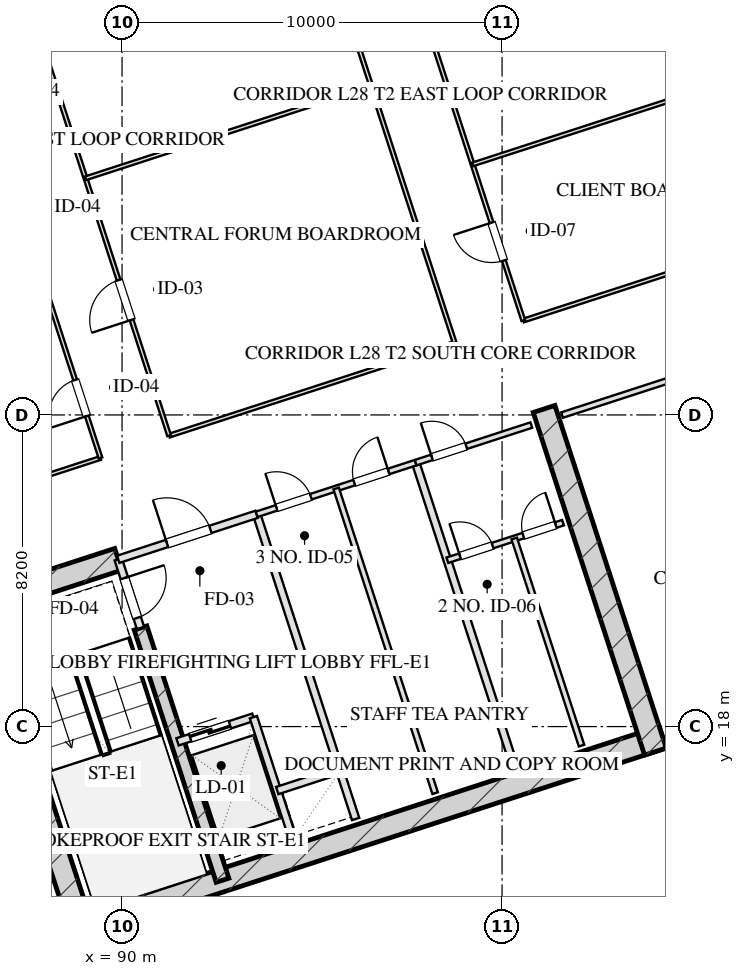
"""IFC4 building model, lengths in metres.
Left out: names, types, materials, properties, quantities, classifications, styles, units other than length and angle.
Written with IfcOpenShell. Run it as: python <this file> out.ifc"""

import sys

from ifc_helpers import new_model, si_unit, direction, frame, frame_2d, origin, place, context, subcontext, project, spatial, rectangle, extrude, element, fill, save


model = new_model("IFC4")
c1 = context("Model", 3, precision=1e-05, world=origin(), true_north=direction((0.0, 1.0)))
c2 = subcontext(c1, "Body", "Model", "MODEL_VIEW")
j1 = project(units=[si_unit("LENGTHUNIT", "METRE"), si_unit("PLANEANGLEUNIT", "RADIAN")], contexts=[c1])
p1 = place(None, origin())
s1 = spatial("IfcSite", under=j1, at=p1, CompositionType="ELEMENT")
p2 = place(p1, origin())
s2 = spatial("IfcBuilding", under=s1, at=p2, CompositionType="ELEMENT")
p3 = place(p2, frame((0.0, 0.0, 110.4)))
s3 = spatial("IfcBuildingStorey", under=s2, at=p3, CompositionType="ELEMENT", Elevation=110.4)
p4 = place(p3, frame((88.63, 12.652, 0.0), z_axis=(0.0, 0.0, 1.0), x_axis=(0.95105714907, 0.309015046886, 0.0)))
e1 = element("IfcWall", 1, at=p4, inside=s3, PredefinedType="SHEAR", context=c2, shape_type="SweptSolid", body=[
    extrude(rectangle(XDim=16.4, YDim=0.6, at=frame_2d((8.2, 0.0))), origin(), (0.0, 0.0, 1.0), 3.45),
])
p5 = place(p3, frame((86.078, 21.475, 0.0), z_axis=(0.0, 0.0, 1.0), x_axis=(0.309017938678, -0.951056209472, 0.0)))
e2 = element("IfcWall", 2, at=p5, inside=s3, PredefinedType="SHEAR", context=c2, shape_type="SweptSolid", body=[
    extrude(rectangle(XDim=9.48, YDim=0.6, at=frame_2d((4.74, 0.0))), origin(), (0.0, 0.0, 1.0), 3.45),
])
p6 = place(p3, frame((101.105, 26.358, 0.0), z_axis=(0.0, 0.0, 1.0), x_axis=(0.309010370028, -0.95105866865, 0.0)))
e3 = element("IfcWall", 3, at=p6, inside=s3, PredefinedType="SHEAR", context=c2, shape_type="SweptSolid", body=[
    extrude(rectangle(XDim=9.48, YDim=0.6, at=frame_2d((4.74, 0.0))), origin(), (0.0, 0.0, 1.0), 3.45),
])
p7 = place(p3, frame((90.486, 20.594, 0.0), z_axis=(0.0, 0.0, 1.0), x_axis=(0.309020428229, -0.951055400562, 0.0)))
e4 = element("IfcWall", 4, at=p7, inside=s3, PredefinedType="SHEAR", context=c2, shape_type="SweptSolid", body=[
    extrude(rectangle(XDim=6.98, YDim=0.35, at=frame_2d((3.49, 0.0))), origin(), (0.0, 0.0, 1.0), 3.45),
])
p8 = place(p3, frame((85.886, 21.097, 0.0), z_axis=(0.0, 0.0, 1.0), x_axis=(0.951068073652, 0.308981422225, 0.0)))
e5 = element("IfcWall", 5, at=p8, inside=s3, PredefinedType="SHEAR", context=c2, shape_type="SweptSolid", body=[
    extrude(rectangle(XDim=4.22, YDim=0.6, at=frame_2d((2.11, 0.0))), origin(), (0.0, 0.0, 1.0), 3.45),
])
p9 = place(p3, frame((99.284, 61.41, 0.0), z_axis=(0.0, 0.0, 1.0), x_axis=(0.309017542002, -0.95105633836, 0.0)))
e6 = element("IfcWall", 6, at=p9, inside=s3, PredefinedType="SOLIDWALL", context=c2, shape_type="SweptSolid", body=[
    extrude(rectangle(XDim=46.4, YDim=0.4, at=frame_2d((23.2, 0.0))), origin(), (0.0, 0.0, 1.0), 2.61),
])
p10 = place(p9, frame((15.6, 0.0, 0.75)))
e7 = element("IfcOpeningElement", 7, at=p10, cuts=e6, PredefinedType="OPENING", context=c2, shape_type="SweptSolid", body=[
    extrude(rectangle(XDim=2.4, YDim=1.46, at=frame_2d((1.2, 0.73))), frame((0.0, 0.21, 0.0), z_axis=(0.0, -1.0, 0.0), x_axis=(1.0, 0.0, 0.0)), (0.0, 0.0, 1.0), 0.42),
])
p11 = place(p9, frame((28.45, 0.0, 0.0)))
e8 = element("IfcOpeningElement", 8, at=p11, cuts=e6, PredefinedType="OPENING", context=c2, shape_type="SweptSolid", body=[
    extrude(rectangle(XDim=1.1, YDim=2.15, at=frame_2d((0.55, 1.075))), frame((0.0, 0.21, 0.0), z_axis=(0.0, -1.0, 0.0), x_axis=(1.0, 0.0, 0.0)), (0.0, 0.0, 1.0), 0.42),
])
p12 = place(p3, frame((111.953, 14.005, 0.0), z_axis=(0.0, 0.0, 1.0), x_axis=(-0.95105505922, -0.309021478754, 0.0)))
e9 = element("IfcWall", 9, at=p12, inside=s3, PredefinedType="SOLIDWALL", context=c2, shape_type="SweptSolid", body=[
    extrude(rectangle(XDim=29.4, YDim=0.4, at=frame_2d((14.7, 0.0))), origin(), (0.0, 0.0, 1.0), 2.61),
])
p13 = place(p3, frame((89.899, 22.401, 0.0), z_axis=(0.0, 0.0, 1.0), x_axis=(0.308932062672, -0.951084108086, 0.0)))
e10 = element("IfcWall", 10, at=p13, inside=s3, PredefinedType="PARTITIONING", context=c2, shape_type="SweptSolid", body=[
    extrude(rectangle(XDim=1.9, YDim=0.2, at=frame_2d((0.95, 0.0))), origin(), (0.0, 0.0, 1.0), 3.175),
])
p14 = place(p13, frame((0.52, 0.0, 0.0)))
e11 = element("IfcOpeningElement", 11, at=p14, cuts=e10, PredefinedType="OPENING", context=c2, shape_type="SweptSolid", body=[
    extrude(rectangle(XDim=1.1, YDim=2.05, at=frame_2d((0.55, 1.025))), frame((0.0, 0.11, 0.0), z_axis=(0.0, -1.0, 0.0), x_axis=(1.0, 0.0, 0.0)), (0.0, 0.0, 1.0), 0.22),
])
p15 = place(p3, frame((93.542, 23.585, 0.0), z_axis=(0.0, 0.0, 1.0), x_axis=(0.309042196757, -0.951048327176, 0.0)))
e12 = element("IfcWall", 12, at=p15, inside=s3, PredefinedType="PARTITIONING", context=c2, shape_type="SweptSolid", body=[
    extrude(rectangle(XDim=8.43, YDim=0.2, at=frame_2d((4.215, 0.0))), origin(), (0.0, 0.0, 1.0), 3.175),
])
p16 = place(p3, frame((89.899, 22.401, 0.0), z_axis=(0.0, 0.0, 1.0), x_axis=(0.951046716504, 0.309047153403, 0.0)))
e13 = element("IfcWall", 13, at=p16, inside=s3, PredefinedType="PARTITIONING", context=c2, shape_type="SweptSolid", body=[
    extrude(rectangle(XDim=3.83, YDim=0.2, at=frame_2d((1.915, 0.0))), origin(), (0.0, 0.0, 1.0), 3.175),
])
p17 = place(p16, frame((1.35, 0.0, 0.0)))
e14 = element("IfcOpeningElement", 14, at=p17, cuts=e13, PredefinedType="OPENING", context=c2, shape_type="SweptSolid", body=[
    extrude(rectangle(XDim=1.2, YDim=2.05, at=frame_2d((0.6, 1.025))), frame((0.0, 0.11, 0.0), z_axis=(0.0, -1.0, 0.0), x_axis=(1.0, 0.0, 0.0)), (0.0, 0.0, 1.0), 0.22),
])
p18 = place(p3, frame((91.46, 17.598, 0.0), z_axis=(0.0, 0.0, 1.0), x_axis=(0.951062257173, 0.308999325213, 0.0)))
e15 = element("IfcWall", 15, at=p18, inside=s3, PredefinedType="PARTITIONING", context=c2, shape_type="SweptSolid", body=[
    extrude(rectangle(XDim=2.1, YDim=0.2, at=frame_2d((1.05, 0.0))), origin(), (0.0, 0.0, 1.0), 3.175),
])
p19 = place(p18, frame((0.35, 0.0, 0.0)))
e16 = element("IfcOpeningElement", 16, at=p19, cuts=e15, PredefinedType="OPENING", context=c2, shape_type="SweptSolid", body=[
    extrude(rectangle(XDim=1.1, YDim=2.05, at=frame_2d((0.55, 1.025))), frame((0.0, 0.11, 0.0), z_axis=(0.0, -1.0, 0.0), x_axis=(1.0, 0.0, 0.0)), (0.0, 0.0, 1.0), 0.22),
])
p20 = place(p3, frame((93.457, 18.247, 0.0), z_axis=(0.0, 0.0, 1.0), x_axis=(0.3089935693, -0.951064127245, 0.0)))
e17 = element("IfcWall", 17, at=p20, inside=s3, PredefinedType="PARTITIONING", context=c2, shape_type="SweptSolid", body=[
    extrude(rectangle(XDim=3.7, YDim=0.2, at=frame_2d((1.85, 0.0))), origin(), (0.0, 0.0, 1.0), 3.175),
])
p21 = place(p3, frame((94.084, 16.317, 0.0), z_axis=(0.0, 0.0, 1.0), x_axis=(0.951041328149, 0.309063734775, 0.0)))
e18 = element("IfcWall", 18, at=p21, inside=s3, PredefinedType="PARTITIONING", context=c2, shape_type="SweptSolid", body=[
    extrude(rectangle(XDim=1.73, YDim=0.2, at=frame_2d((0.865, 0.0))), origin(), (0.0, 0.0, 1.0), 3.175),
])
p22 = place(p3, frame((97.727, 24.944, 0.0), z_axis=(0.0, 0.0, 1.0), x_axis=(0.309016001439, -0.951056838919, 0.0)))
e19 = element("IfcWall", 19, at=p22, inside=s3, PredefinedType="PARTITIONING", context=c2, shape_type="SweptSolid", body=[
    extrude(rectangle(XDim=8.43, YDim=0.2, at=frame_2d((4.215, 0.0))), origin(), (0.0, 0.0, 1.0), 3.175),
])
p23 = place(p3, frame((93.542, 23.585, 0.0), z_axis=(0.0, 0.0, 1.0), x_axis=(0.951063829732, 0.308994485023, 0.0)))
e20 = element("IfcWall", 20, at=p23, inside=s3, PredefinedType="PARTITIONING", context=c2, shape_type="SweptSolid", body=[
    extrude(rectangle(XDim=4.4, YDim=0.15, at=frame_2d((2.2, 0.0))), origin(), (0.0, 0.0, 1.0), 3.175),
])
p24 = place(p23, frame((0.55, 0.0, 0.0)))
e21 = element("IfcOpeningElement", 21, at=p24, cuts=e20, PredefinedType="OPENING", context=c2, shape_type="SweptSolid", body=[
    extrude(rectangle(XDim=0.95, YDim=2.05, at=frame_2d((0.475, 1.025))), frame((0.0, 0.085, 0.0), z_axis=(0.0, -1.0, 0.0), x_axis=(1.0, 0.0, 0.0)), (0.0, 0.0, 1.0), 0.17),
])
p25 = place(p23, frame((2.7, 0.0, 0.0)))
e22 = element("IfcOpeningElement", 22, at=p25, cuts=e20, PredefinedType="OPENING", context=c2, shape_type="SweptSolid", body=[
    extrude(rectangle(XDim=0.95, YDim=2.05, at=frame_2d((0.475, 1.025))), frame((0.0, 0.085, 0.0), z_axis=(0.0, -1.0, 0.0), x_axis=(1.0, 0.0, 0.0)), (0.0, 0.0, 1.0), 0.17),
])
p26 = place(p3, frame((95.634, 24.265, 0.0), z_axis=(0.0, 0.0, 1.0), x_axis=(0.309007490203, -0.951059604335, 0.0)))
e23 = element("IfcWall", 23, at=p26, inside=s3, PredefinedType="PARTITIONING", context=c2, shape_type="SweptSolid", body=[
    extrude(rectangle(XDim=8.43, YDim=0.15, at=frame_2d((4.215, 0.0))), origin(), (0.0, 0.0, 1.0), 3.175),
])
p27 = place(p3, frame((97.727, 24.944, 0.0), z_axis=(0.0, 0.0, 1.0), x_axis=(0.951036872128, 0.309077446369, 0.0)))
e24 = element("IfcWall", 24, at=p27, inside=s3, PredefinedType="PARTITIONING", context=c2, shape_type="SweptSolid", body=[
    extrude(rectangle(XDim=3.2, YDim=0.15, at=frame_2d((1.6, 0.0))), origin(), (0.0, 0.0, 1.0), 3.175),
])
p28 = place(p27, frame((0.45, 0.0, 0.0)))
e25 = element("IfcOpeningElement", 25, at=p28, cuts=e24, PredefinedType="OPENING", context=c2, shape_type="SweptSolid", body=[
    extrude(rectangle(XDim=0.95, YDim=2.05, at=frame_2d((0.475, 1.025))), frame((0.0, 0.085, 0.0), z_axis=(0.0, -1.0, 0.0), x_axis=(1.0, 0.0, 0.0)), (0.0, 0.0, 1.0), 0.17),
])
p29 = place(p3, frame((98.561, 22.376, 0.0), z_axis=(0.0, 0.0, 1.0), x_axis=(0.95104415986, 0.309055020985, 0.0)))
e26 = element("IfcWall", 26, at=p29, inside=s3, PredefinedType="PARTITIONING", context=c2, shape_type="SweptSolid", body=[
    extrude(rectangle(XDim=3.2, YDim=0.15, at=frame_2d((1.6, 0.0))), origin(), (0.0, 0.0, 1.0), 3.175),
])
p30 = place(p29, frame((0.35, 0.0, 0.0)))
e27 = element("IfcOpeningElement", 27, at=p30, cuts=e26, PredefinedType="OPENING", context=c2, shape_type="SweptSolid", body=[
    extrude(rectangle(XDim=0.9, YDim=2.05, at=frame_2d((0.45, 1.025))), frame((0.0, 0.085, 0.0), z_axis=(0.0, -1.0, 0.0), x_axis=(1.0, 0.0, 0.0)), (0.0, 0.0, 1.0), 0.17),
])
p31 = place(p29, frame((2.1, 0.0, 0.0)))
e28 = element("IfcOpeningElement", 28, at=p31, cuts=e26, PredefinedType="OPENING", context=c2, shape_type="SweptSolid", body=[
    extrude(rectangle(XDim=0.9, YDim=2.05, at=frame_2d((0.45, 1.025))), frame((0.0, 0.085, 0.0), z_axis=(0.0, -1.0, 0.0), x_axis=(1.0, 0.0, 0.0)), (0.0, 0.0, 1.0), 0.17),
])
p32 = place(p3, frame((100.32, 22.948, 0.0), z_axis=(0.0, 0.0, 1.0), x_axis=(0.309035009867, -0.951050662518, 0.0)))
e29 = element("IfcWall", 29, at=p32, inside=s3, PredefinedType="PARTITIONING", context=c2, shape_type="SweptSolid", body=[
    extrude(rectangle(XDim=5.73, YDim=0.15, at=frame_2d((2.865, 0.0))), origin(), (0.0, 0.0, 1.0), 3.175),
])
p33 = place(p3, frame((101.578, 26.196, 0.0), z_axis=(0.0, 0.0, 1.0), x_axis=(0.951062770994, 0.308997743729, 0.0)))
e30 = element("IfcWall", 30, at=p33, inside=s3, PredefinedType="PARTITIONING", context=c2, shape_type="SweptSolid", body=[
    extrude(rectangle(XDim=8.5, YDim=0.15, at=frame_2d((4.25, 0.0))), origin(), (0.0, 0.0, 1.0), 3.175),
])
p34 = place(p33, frame((3.57, 0.0, 0.0)))
e31 = element("IfcOpeningElement", 31, at=p34, cuts=e30, PredefinedType="OPENING", context=c2, shape_type="SweptSolid", body=[
    extrude(rectangle(XDim=0.85, YDim=2.05, at=frame_2d((0.425, 1.025))), frame((0.0, 0.085, 0.0), z_axis=(0.0, -1.0, 0.0), x_axis=(1.0, 0.0, 0.0)), (0.0, 0.0, 1.0), 0.17),
])
p35 = place(p3, frame((76.308, 20.803, 0.0), z_axis=(0.0, 0.0, 1.0), x_axis=(0.951058377365, 0.309011266531, 0.0)))
e32 = element("IfcWall", 32, at=p35, inside=s3, PredefinedType="MOVABLE", context=c2, shape_type="SweptSolid", body=[
    extrude(rectangle(XDim=13.8, YDim=0.1, at=frame_2d((6.9, 0.0))), origin(), (0.0, 0.0, 1.0), 3.175),
])
p36 = place(p3, frame((91.24, 25.655, 0.0), z_axis=(0.0, 0.0, 1.0), x_axis=(0.951060182336, 0.309005711233, 0.0)))
e33 = element("IfcWall", 33, at=p36, inside=s3, PredefinedType="MOVABLE", context=c2, shape_type="SweptSolid", body=[
    extrude(rectangle(XDim=7.9, YDim=0.1, at=frame_2d((3.95, 0.0))), origin(), (0.0, 0.0, 1.0), 3.175),
])
p37 = place(p3, frame((100.56, 28.683, 0.0), z_axis=(0.0, 0.0, 1.0), x_axis=(0.951055307445, 0.309020714809, 0.0)))
e34 = element("IfcWall", 34, at=p37, inside=s3, PredefinedType="MOVABLE", context=c2, shape_type="SweptSolid", body=[
    extrude(rectangle(XDim=8.7, YDim=0.1, at=frame_2d((4.35, 0.0))), origin(), (0.0, 0.0, 1.0), 3.175),
])
p38 = place(p3, frame((89.433, 25.067, 0.0), z_axis=(0.0, 0.0, 1.0), x_axis=(-0.30901773025, 0.951056277195, 0.0)))
e35 = element("IfcWall", 35, at=p38, inside=s3, PredefinedType="MOVABLE", context=c2, shape_type="SweptSolid", body=[
    extrude(rectangle(XDim=16.64, YDim=0.1, at=frame_2d((8.32, 0.0))), origin(), (0.0, 0.0, 1.0), 3.175),
])
p39 = place(p38, frame((1.16, 0.0, 0.0)))
e36 = element("IfcOpeningElement", 36, at=p39, cuts=e35, PredefinedType="OPENING", context=c2, shape_type="SweptSolid", body=[
    extrude(rectangle(XDim=1.0, YDim=2.05, at=frame_2d((0.5, 1.025))), frame((0.0, 0.06, 0.0), z_axis=(0.0, -1.0, 0.0), x_axis=(1.0, 0.0, 0.0)), (0.0, 0.0, 1.0), 0.12),
])
p40 = place(p38, frame((6.16, 0.0, 0.0)))
e37 = element("IfcOpeningElement", 37, at=p40, cuts=e35, PredefinedType="OPENING", context=c2, shape_type="SweptSolid", body=[
    extrude(rectangle(XDim=1.0, YDim=2.05, at=frame_2d((0.5, 1.025))), frame((0.0, 0.06, 0.0), z_axis=(0.0, -1.0, 0.0), x_axis=(1.0, 0.0, 0.0)), (0.0, 0.0, 1.0), 0.12),
])
p41 = place(p38, frame((10.16, 0.0, 0.0)))
e38 = element("IfcOpeningElement", 38, at=p41, cuts=e35, PredefinedType="OPENING", context=c2, shape_type="SweptSolid", body=[
    extrude(rectangle(XDim=1.0, YDim=2.05, at=frame_2d((0.5, 1.025))), frame((0.0, 0.06, 0.0), z_axis=(0.0, -1.0, 0.0), x_axis=(1.0, 0.0, 0.0)), (0.0, 0.0, 1.0), 0.12),
])
p42 = place(p38, frame((14.48, 0.0, 0.0)))
e39 = element("IfcOpeningElement", 39, at=p42, cuts=e35, PredefinedType="OPENING", context=c2, shape_type="SweptSolid", body=[
    extrude(rectangle(XDim=1.0, YDim=2.05, at=frame_2d((0.5, 1.025))), frame((0.0, 0.06, 0.0), z_axis=(0.0, -1.0, 0.0), x_axis=(1.0, 0.0, 0.0)), (0.0, 0.0, 1.0), 0.12),
])
p43 = place(p3, frame((91.24, 25.655, 0.0), z_axis=(0.0, 0.0, 1.0), x_axis=(-0.30901773025, 0.951056277195, 0.0)))
e40 = element("IfcWall", 40, at=p43, inside=s3, PredefinedType="MOVABLE", context=c2, shape_type="SweptSolid", body=[
    extrude(rectangle(XDim=16.64, YDim=0.1, at=frame_2d((8.32, 0.0))), origin(), (0.0, 0.0, 1.0), 3.175),
])
p44 = place(p43, frame((3.204, 0.0, 0.0)))
e41 = element("IfcOpeningElement", 41, at=p44, cuts=e40, PredefinedType="OPENING", context=c2, shape_type="SweptSolid", body=[
    extrude(rectangle(XDim=1.1, YDim=2.05, at=frame_2d((0.55, 1.025))), frame((0.0, 0.06, 0.0), z_axis=(0.0, -1.0, 0.0), x_axis=(1.0, 0.0, 0.0)), (0.0, 0.0, 1.0), 0.12),
])
p45 = place(p43, frame((11.404, 0.0, 0.0)))
e42 = element("IfcOpeningElement", 42, at=p45, cuts=e40, PredefinedType="OPENING", context=c2, shape_type="SweptSolid", body=[
    extrude(rectangle(XDim=1.1, YDim=2.05, at=frame_2d((0.55, 1.025))), frame((0.0, 0.06, 0.0), z_axis=(0.0, -1.0, 0.0), x_axis=(1.0, 0.0, 0.0)), (0.0, 0.0, 1.0), 0.12),
])
p46 = place(p3, frame((98.753, 28.096, 0.0), z_axis=(0.0, 0.0, 1.0), x_axis=(-0.30901773025, 0.951056277195, 0.0)))
e43 = element("IfcWall", 43, at=p46, inside=s3, PredefinedType="MOVABLE", context=c2, shape_type="SweptSolid", body=[
    extrude(rectangle(XDim=16.64, YDim=0.1, at=frame_2d((8.32, 0.0))), origin(), (0.0, 0.0, 1.0), 3.175),
])
p47 = place(p3, frame((100.56, 28.683, 0.0), z_axis=(0.0, 0.0, 1.0), x_axis=(-0.309004459387, 0.951060589068, 0.0)))
e44 = element("IfcWall", 44, at=p47, inside=s3, PredefinedType="MOVABLE", context=c2, shape_type="SweptSolid", body=[
    extrude(rectangle(XDim=16.64, YDim=0.1, at=frame_2d((8.32, 0.0))), origin(), (0.0, 0.0, 1.0), 3.175),
])
p48 = place(p47, frame((1.66, 0.0, 0.0)))
e45 = element("IfcOpeningElement", 45, at=p48, cuts=e44, PredefinedType="OPENING", context=c2, shape_type="SweptSolid", body=[
    extrude(rectangle(XDim=1.05, YDim=2.05, at=frame_2d((0.525, 1.025))), frame((0.0, 0.06, 0.0), z_axis=(0.0, -1.0, 0.0), x_axis=(1.0, 0.0, 0.0)), (0.0, 0.0, 1.0), 0.12),
])
p49 = place(p47, frame((7.82, 0.0, 0.0)))
e46 = element("IfcOpeningElement", 46, at=p49, cuts=e44, PredefinedType="OPENING", context=c2, shape_type="SweptSolid", body=[
    extrude(rectangle(XDim=1.0, YDim=2.05, at=frame_2d((0.5, 1.025))), frame((0.0, 0.06, 0.0), z_axis=(0.0, -1.0, 0.0), x_axis=(1.0, 0.0, 0.0)), (0.0, 0.0, 1.0), 0.12),
])
p50 = place(p47, frame((13.98, 0.0, 0.0)))
e47 = element("IfcOpeningElement", 47, at=p50, cuts=e44, PredefinedType="OPENING", context=c2, shape_type="SweptSolid", body=[
    extrude(rectangle(XDim=0.85, YDim=2.05, at=frame_2d((0.425, 1.025))), frame((0.0, 0.06, 0.0), z_axis=(0.0, -1.0, 0.0), x_axis=(1.0, 0.0, 0.0)), (0.0, 0.0, 1.0), 0.12),
])
p51 = place(p3, frame((89.039, 32.426, 0.0), z_axis=(0.0, 0.0, 1.0), x_axis=(0.951051099951, 0.309033663672, 0.0)))
e48 = element("IfcWall", 48, at=p51, inside=s3, PredefinedType="MOVABLE", context=c2, shape_type="SweptSolid", body=[
    extrude(rectangle(XDim=7.9, YDim=0.1, at=frame_2d((3.95, 0.0))), origin(), (0.0, 0.0, 1.0), 3.175),
])
p52 = place(p3, frame((99.225, 32.792, 0.0), z_axis=(0.0, 0.0, 1.0), x_axis=(0.951055307445, 0.309020714809, 0.0)))
e49 = element("IfcWall", 49, at=p52, inside=s3, PredefinedType="MOVABLE", context=c2, shape_type="SweptSolid", body=[
    extrude(rectangle(XDim=8.7, YDim=0.1, at=frame_2d((4.35, 0.0))), origin(), (0.0, 0.0, 1.0), 3.175),
])
p53 = place(p14, origin())
e50 = element("IfcDoor", 50, at=p53, inside=s3, OperationType="SINGLE_SWING_LEFT", PredefinedType="DOOR", context=c2, shape_type="SweptSolid", body=[
    extrude(rectangle(XDim=1.1, YDim=2.05, at=frame_2d((0.55, 1.025))), frame((0.0, 0.025, 0.0), z_axis=(0.0, -1.0, 0.0), x_axis=(1.0, 0.0, 0.0)), (0.0, 0.0, 1.0), 0.05),
])
fill(e11, e50)
p54 = place(p17, origin())
e51 = element("IfcDoor", 51, at=p54, inside=s3, OperationType="SINGLE_SWING_LEFT", PredefinedType="DOOR", context=c2, shape_type="SweptSolid", body=[
    extrude(rectangle(XDim=1.2, YDim=2.05, at=frame_2d((0.6, 1.025))), frame((0.0, 0.025, 0.0), z_axis=(0.0, -1.0, 0.0), x_axis=(1.0, 0.0, 0.0)), (0.0, 0.0, 1.0), 0.05),
])
fill(e14, e51)
p55 = place(p19, origin())
e52 = element("IfcDoor", 52, at=p55, inside=s3, OperationType="DOUBLE_DOOR_SLIDING", PredefinedType="DOOR", context=c2, shape_type="SweptSolid", body=[
    extrude(rectangle(XDim=1.1, YDim=2.05, at=frame_2d((0.55, 1.025))), frame((0.0, 0.025, 0.0), z_axis=(0.0, -1.0, 0.0), x_axis=(1.0, 0.0, 0.0)), (0.0, 0.0, 1.0), 0.05),
])
fill(e16, e52)
p56 = place(p24, origin())
e53 = element("IfcDoor", 53, at=p56, inside=s3, OperationType="SINGLE_SWING_LEFT", PredefinedType="DOOR", context=c2, shape_type="SweptSolid", body=[
    extrude(rectangle(XDim=0.95, YDim=2.05, at=frame_2d((0.475, 1.025))), frame((0.0, 0.025, 0.0), z_axis=(0.0, -1.0, 0.0), x_axis=(1.0, 0.0, 0.0)), (0.0, 0.0, 1.0), 0.05),
])
fill(e21, e53)
p57 = place(p25, origin())
e54 = element("IfcDoor", 54, at=p57, inside=s3, OperationType="SINGLE_SWING_RIGHT", PredefinedType="DOOR", context=c2, shape_type="SweptSolid", body=[
    extrude(rectangle(XDim=0.95, YDim=2.05, at=frame_2d((0.475, 1.025))), frame((0.0, 0.025, 0.0), z_axis=(0.0, -1.0, 0.0), x_axis=(1.0, 0.0, 0.0)), (0.0, 0.0, 1.0), 0.05),
])
fill(e22, e54)
p58 = place(p28, origin())
e55 = element("IfcDoor", 55, at=p58, inside=s3, OperationType="SINGLE_SWING_LEFT", PredefinedType="DOOR", context=c2, shape_type="SweptSolid", body=[
    extrude(rectangle(XDim=0.95, YDim=2.05, at=frame_2d((0.475, 1.025))), frame((0.0, 0.025, 0.0), z_axis=(0.0, -1.0, 0.0), x_axis=(1.0, 0.0, 0.0)), (0.0, 0.0, 1.0), 0.05),
])
fill(e25, e55)
p59 = place(p30, origin())
e56 = element("IfcDoor", 56, at=p59, inside=s3, OperationType="SINGLE_SWING_LEFT", PredefinedType="DOOR", context=c2, shape_type="SweptSolid", body=[
    extrude(rectangle(XDim=0.9, YDim=2.05, at=frame_2d((0.45, 1.025))), frame((0.0, 0.025, 0.0), z_axis=(0.0, -1.0, 0.0), x_axis=(1.0, 0.0, 0.0)), (0.0, 0.0, 1.0), 0.05),
])
fill(e27, e56)
p60 = place(p31, origin())
e57 = element("IfcDoor", 57, at=p60, inside=s3, OperationType="SINGLE_SWING_RIGHT", PredefinedType="DOOR", context=c2, shape_type="SweptSolid", body=[
    extrude(rectangle(XDim=0.9, YDim=2.05, at=frame_2d((0.45, 1.025))), frame((0.0, 0.025, 0.0), z_axis=(0.0, -1.0, 0.0), x_axis=(1.0, 0.0, 0.0)), (0.0, 0.0, 1.0), 0.05),
])
fill(e28, e57)
p61 = place(p39, origin())
e58 = element("IfcDoor", 58, at=p61, inside=s3, OperationType="SINGLE_SWING_LEFT", PredefinedType="DOOR", context=c2, shape_type="SweptSolid", body=[
    extrude(rectangle(XDim=1.0, YDim=2.05, at=frame_2d((0.5, 1.025))), frame((0.0, 0.025, 0.0), z_axis=(0.0, -1.0, 0.0), x_axis=(1.0, 0.0, 0.0)), (0.0, 0.0, 1.0), 0.05),
])
fill(e36, e58)
p62 = place(p44, origin())
e59 = element("IfcDoor", 59, at=p62, inside=s3, OperationType="SINGLE_SWING_LEFT", PredefinedType="DOOR", context=c2, shape_type="SweptSolid", body=[
    extrude(rectangle(XDim=1.1, YDim=2.05, at=frame_2d((0.55, 1.025))), frame((0.0, 0.025, 0.0), z_axis=(0.0, -1.0, 0.0), x_axis=(1.0, 0.0, 0.0)), (0.0, 0.0, 1.0), 0.05),
])
fill(e41, e59)
p63 = place(p48, origin())
e60 = element("IfcDoor", 60, at=p63, inside=s3, OperationType="SINGLE_SWING_RIGHT", PredefinedType="DOOR", context=c2, shape_type="SweptSolid", body=[
    extrude(rectangle(XDim=1.05, YDim=2.05, at=frame_2d((0.525, 1.025))), frame((0.0, 0.025, 0.0), z_axis=(0.0, -1.0, 0.0), x_axis=(1.0, 0.0, 0.0)), (0.0, 0.0, 1.0), 0.05),
])
fill(e45, e60)
save(model, sys.argv[1])
